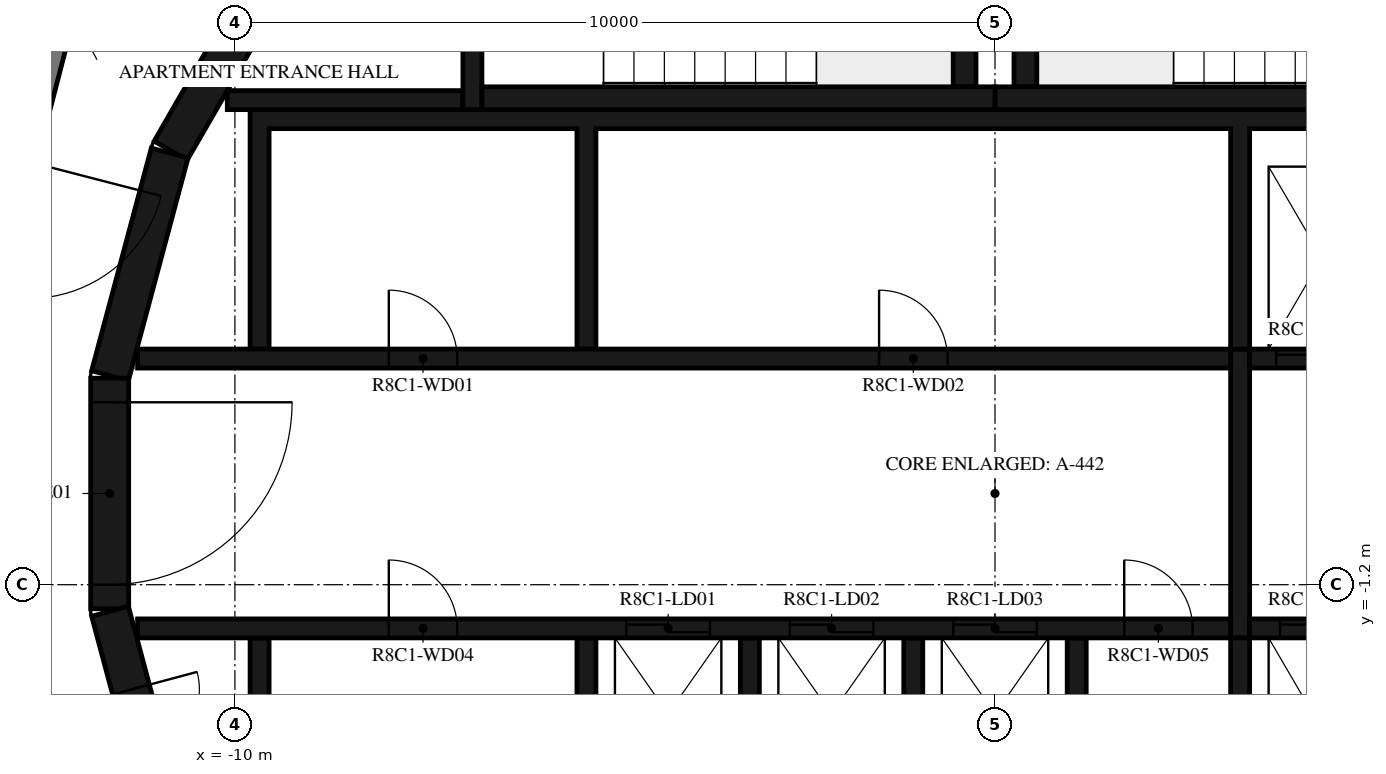
"""IFC4 building model, lengths in metres.
Left out: names, types, materials, properties, quantities, classifications, styles, units other than length and angle.
Written with IfcOpenShell. Run it as: python <this file> out.ifc"""

import sys

from ifc_helpers import new_model, si_unit, direction, frame, frame_2d, origin, place, context, subcontext, project, spatial, polyline, rectangle, outline, extrude, element, fill, save


model = new_model("IFC4")
c1 = context("Model", 3, precision=1e-05, world=origin(), true_north=direction((0.0, 1.0)))
c2 = subcontext(c1, "Body", "Model", "MODEL_VIEW")
j1 = project(units=[si_unit("LENGTHUNIT", "METRE"), si_unit("PLANEANGLEUNIT", "RADIAN")], contexts=[c1])
p1 = place(None, origin())
s1 = spatial("IfcSite", under=j1, at=p1, CompositionType="ELEMENT")
p2 = place(p1, origin())
s2 = spatial("IfcBuilding", under=s1, at=p2, CompositionType="ELEMENT")
p3 = place(p2, frame((0.0, 0.0, 322.7)))
s3 = spatial("IfcBuildingStorey", under=s2, at=p3, CompositionType="ELEMENT", Elevation=322.7)
for number, where, z_axis, x_axis in (
    (1, (-9.329, 7.137, 0.0), (0.0, 0.0, 1.0), (-0.5, -0.866, 0.0)),
    (2, (-10.858, 4.479, 0.0), (0.0, 0.0, 1.0), (-0.259, -0.966, 0.0)),
):
    element("IfcWall", number, at=place(p3, frame(where, z_axis=z_axis, x_axis=x_axis)), inside=s3, PredefinedType="SHEAR", context=c2, shape_type="SweptSolid", body=[
        extrude(rectangle(XDim=3.033, YDim=0.5, at=frame_2d((1.516, 0.0))), origin(), (0.0, 0.0, 1.0), 3.05),
    ])
p4 = place(p3, frame((-11.647, 1.516, 0.0), z_axis=(0.0, 0.0, 1.0), x_axis=(0.0, -1.0, 0.0)))
e3 = element("IfcWall", 3, at=p4, inside=s3, PredefinedType="SHEAR", context=c2, shape_type="SweptSolid", body=[
    extrude(rectangle(XDim=3.033, YDim=0.5, at=frame_2d((1.516, 0.0))), origin(), (0.0, 0.0, 1.0), 3.05),
])
p5 = place(p4, frame((0.316, 0.0, 0.0)))
e4 = element("IfcOpeningElement", 4, at=p5, cuts=e3, PredefinedType="OPENING", context=c2, shape_type="SweptSolid", body=[
    extrude(rectangle(XDim=2.4, YDim=2.1, at=frame_2d((1.2, 1.05))), frame((0.0, 0.26, 0.0), z_axis=(0.0, -1.0, 0.0), x_axis=(1.0, 0.0, 0.0)), (0.0, 0.0, 1.0), 0.52),
])
p6 = place(p3, frame((-11.643, -1.55, 0.0), z_axis=(0.0, 0.0, 1.0), x_axis=(0.258734743916, -0.965948410781, 0.0)))
e5 = element("IfcWall", 5, at=p6, inside=s3, PredefinedType="SHEAR", context=c2, shape_type="SweptSolid", body=[
    extrude(rectangle(XDim=3.033, YDim=0.5, at=frame_2d((1.516, 0.0))), origin(), (0.0, 0.0, 1.0), 3.05),
])
p7 = place(p6, frame((1.066, 0.0, 0.0)))
e6 = element("IfcOpeningElement", 6, at=p7, cuts=e5, PredefinedType="OPENING", context=c2, shape_type="SweptSolid", body=[
    extrude(rectangle(XDim=0.9, YDim=2.1, at=frame_2d((0.45, 1.05))), frame((0.0, 0.26, 0.0), z_axis=(0.0, -1.0, 0.0), x_axis=(1.0, 0.0, 0.0)), (0.0, 0.0, 1.0), 0.52),
])
p8 = place(p3, frame((0.0, 5.2, 0.0), z_axis=(0.0, 0.0, 1.0), x_axis=(1.0, 0.0, 0.0)))
e7 = element("IfcWall", 7, at=p8, inside=s3, PredefinedType="SHEAR", context=c2, shape_type="SweptSolid", body=[
    extrude(rectangle(XDim=6.75, YDim=0.3, at=frame_2d((3.375, 0.0))), origin(), (0.0, 0.0, 1.0), 3.05),
])
p9 = place(p3, frame((0.4, 5.35, 0.0), z_axis=(0.0, 0.0, 1.0), x_axis=(0.0, 1.0, 0.0)))
e8 = element("IfcWall", 8, at=p9, inside=s3, PredefinedType="SHEAR", context=c2, shape_type="SweptSolid", body=[
    extrude(rectangle(XDim=3.32, YDim=0.3, at=frame_2d((1.66, 0.0))), origin(), (0.0, 0.0, 1.0), 3.05),
])
p10 = place(p3, frame((-6.75, 5.2, 0.0), z_axis=(0.0, 0.0, 1.0), x_axis=(1.0, 0.0, 0.0)))
e9 = element("IfcWall", 9, at=p10, inside=s3, PredefinedType="SHEAR", context=c2, shape_type="SweptSolid", body=[
    extrude(rectangle(XDim=6.75, YDim=0.3, at=frame_2d((3.375, 0.0))), origin(), (0.0, 0.0, 1.0), 3.05),
])
p11 = place(p3, frame((-0.4, 5.35, 0.0), z_axis=(0.0, 0.0, 1.0), x_axis=(0.0, 1.0, 0.0)))
e10 = element("IfcWall", 10, at=p11, inside=s3, PredefinedType="SHEAR", context=c2, shape_type="SweptSolid", body=[
    extrude(rectangle(XDim=3.32, YDim=0.3, at=frame_2d((1.66, 0.0))), origin(), (0.0, 0.0, 1.0), 3.05),
])
p12 = place(p3, frame((-6.875, 8.97, 0.0), z_axis=(0.0, 0.0, 1.0), x_axis=(0.0, -1.0, 0.0)))
e11 = element("IfcWall", 11, at=p12, inside=s3, PredefinedType="SHEAR", context=c2, shape_type="SweptSolid", body=[
    extrude(rectangle(XDim=3.92, YDim=0.25, at=frame_2d((1.96, 0.0))), origin(), (0.0, 0.0, 1.0), 3.05),
])
p13 = place(p12, frame((1.61, 0.0, 0.0)))
e12 = element("IfcOpeningElement", 12, at=p13, cuts=e11, PredefinedType="OPENING", context=c2, shape_type="SweptSolid", body=[
    extrude(rectangle(XDim=1.2, YDim=2.1, at=frame_2d((0.6, 1.05))), frame((0.0, 0.135, 0.0), z_axis=(0.0, -1.0, 0.0), x_axis=(1.0, 0.0, 0.0)), (0.0, 0.0, 1.0), 0.27),
])
p14 = place(p3, frame((-7.0, 5.175, 0.0), z_axis=(0.0, 0.0, 1.0), x_axis=(-1.0, 0.0, 0.0)))
e13 = element("IfcWall", 13, at=p14, inside=s3, PredefinedType="SHEAR", context=c2, shape_type="SweptSolid", body=[
    extrude(rectangle(XDim=3.1, YDim=0.25, at=frame_2d((1.55, 0.0))), origin(), (0.0, 0.0, 1.0), 3.05),
])
p15 = place(p3, origin())
e14 = element("IfcWall", 14, at=p15, inside=s3, PredefinedType="SHEAR", context=c2, shape_type="SweptSolid", body=[
    extrude(outline(polyline([(-9.8, 1.9), (-9.55, 1.9), (-9.55, 4.8), (-5.5, 4.8), (-5.5, 1.9), (-5.25, 1.9), (-5.25, 4.8), (3.1, 4.8), (3.1, 1.9), (3.35, 1.9), (3.35, 4.8), (5.25, 4.8), (5.25, 1.9), (5.5, 1.9), (5.5, 4.8), (7.4, 4.8), (7.4, 1.9), (7.65, 1.9), (7.65, 4.8), (9.55, 4.8), (9.55, 1.9), (9.8, 1.9), (9.8, 4.8), (9.8, 5.05), (-9.8, 5.05), (-9.8, 4.8), (-9.8, 1.9)])), origin(), (0.0, 0.0, 1.0), 3.05),
])
p16 = place(p3, origin())
e15 = element("IfcWall", 15, at=p16, inside=s3, PredefinedType="SHEAR", context=c2, shape_type="SweptSolid", body=[
    extrude(outline(polyline([(9.8, -5.05), (9.8, -4.8), (9.8, -1.9), (9.55, -1.9), (9.55, -4.8), (7.65, -4.8), (7.65, -1.9), (7.4, -1.9), (7.4, -4.8), (5.5, -4.8), (5.5, -1.9), (5.25, -1.9), (5.25, -4.8), (3.35, -4.8), (3.35, -1.9), (3.1, -1.9), (3.1, -4.8), (1.2, -4.8), (1.2, -1.9), (0.95, -1.9), (0.95, -4.8), (-0.95, -4.8), (-0.95, -1.9), (-1.2, -1.9), (-1.2, -4.8), (-3.1, -4.8), (-3.1, -1.9), (-3.35, -1.9), (-3.35, -4.8), (-5.25, -4.8), (-5.25, -1.9), (-5.5, -1.9), (-5.5, -4.8), (-9.55, -4.8), (-9.55, -1.9), (-9.8, -1.9), (-9.8, -4.8), (-9.8, -5.05), (9.8, -5.05)])), origin(), (0.0, 0.0, 1.0), 3.05),
])
p17 = place(p3, frame((-11.28, 1.775, 0.0), z_axis=(0.0, 0.0, 1.0), x_axis=(1.0, 0.0, 0.0)))
e16 = element("IfcWall", 16, at=p17, inside=s3, PredefinedType="SHEAR", context=c2, shape_type="SweptSolid", body=[
    extrude(rectangle(XDim=14.38, YDim=0.25, at=frame_2d((7.19, 0.0))), origin(), (0.0, 0.0, 1.0), 3.05),
])
p18 = place(p17, frame((3.305, 0.0, 0.0)))
e17 = element("IfcOpeningElement", 17, at=p18, cuts=e16, PredefinedType="OPENING", context=c2, shape_type="SweptSolid", body=[
    extrude(rectangle(XDim=0.9, YDim=2.1, at=frame_2d((0.45, 1.05))), frame((0.0, 0.135, 0.0), z_axis=(0.0, -1.0, 0.0), x_axis=(1.0, 0.0, 0.0)), (0.0, 0.0, 1.0), 0.27),
])
p19 = place(p17, frame((9.755, 0.0, 0.0)))
e18 = element("IfcOpeningElement", 18, at=p19, cuts=e16, PredefinedType="OPENING", context=c2, shape_type="SweptSolid", body=[
    extrude(rectangle(XDim=0.9, YDim=2.1, at=frame_2d((0.45, 1.05))), frame((0.0, 0.135, 0.0), z_axis=(0.0, -1.0, 0.0), x_axis=(1.0, 0.0, 0.0)), (0.0, 0.0, 1.0), 0.27),
])
p20 = place(p3, frame((3.35, 1.775, 0.0), z_axis=(0.0, 0.0, 1.0), x_axis=(1.0, 0.0, 0.0)))
e19 = element("IfcWall", 19, at=p20, inside=s3, PredefinedType="SHEAR", context=c2, shape_type="SweptSolid", body=[
    extrude(rectangle(XDim=7.93, YDim=0.25, at=frame_2d((3.965, 0.0))), origin(), (0.0, 0.0, 1.0), 3.05),
])
p21 = place(p20, frame((0.35, 0.0, 0.0)))
e20 = element("IfcOpeningElement", 20, at=p21, cuts=e19, PredefinedType="OPENING", context=c2, shape_type="SweptSolid", body=[
    extrude(rectangle(XDim=1.2, YDim=2.4, at=frame_2d((0.6, 1.2))), frame((0.0, 0.135, 0.0), z_axis=(0.0, -1.0, 0.0), x_axis=(1.0, 0.0, 0.0)), (0.0, 0.0, 1.0), 0.27),
])
p22 = place(p20, frame((2.5, 0.0, 0.0)))
e21 = element("IfcOpeningElement", 21, at=p22, cuts=e19, PredefinedType="OPENING", context=c2, shape_type="SweptSolid", body=[
    extrude(rectangle(XDim=1.2, YDim=2.4, at=frame_2d((0.6, 1.2))), frame((0.0, 0.135, 0.0), z_axis=(0.0, -1.0, 0.0), x_axis=(1.0, 0.0, 0.0)), (0.0, 0.0, 1.0), 0.27),
])
p23 = place(p20, frame((4.8, 0.0, 0.0)))
e22 = element("IfcOpeningElement", 22, at=p23, cuts=e19, PredefinedType="OPENING", context=c2, shape_type="SweptSolid", body=[
    extrude(rectangle(XDim=0.9, YDim=2.1, at=frame_2d((0.45, 1.05))), frame((0.0, 0.135, 0.0), z_axis=(0.0, -1.0, 0.0), x_axis=(1.0, 0.0, 0.0)), (0.0, 0.0, 1.0), 0.27),
])
p24 = place(p3, frame((-11.28, -1.775, 0.0), z_axis=(0.0, 0.0, 1.0), x_axis=(1.0, 0.0, 0.0)))
e23 = element("IfcWall", 23, at=p24, inside=s3, PredefinedType="SHEAR", context=c2, shape_type="SweptSolid", body=[
    extrude(rectangle(XDim=14.38, YDim=0.25, at=frame_2d((7.19, 0.0))), origin(), (0.0, 0.0, 1.0), 3.05),
])
p25 = place(p24, frame((6.43, 0.0, 0.0)))
e24 = element("IfcOpeningElement", 24, at=p25, cuts=e23, PredefinedType="OPENING", context=c2, shape_type="SweptSolid", body=[
    extrude(rectangle(XDim=1.1, YDim=2.1, at=frame_2d((0.55, 1.05))), frame((0.0, 0.135, 0.0), z_axis=(0.0, -1.0, 0.0), x_axis=(1.0, 0.0, 0.0)), (0.0, 0.0, 1.0), 0.27),
])
p26 = place(p24, frame((8.58, 0.0, 0.0)))
e25 = element("IfcOpeningElement", 25, at=p26, cuts=e23, PredefinedType="OPENING", context=c2, shape_type="SweptSolid", body=[
    extrude(rectangle(XDim=1.1, YDim=2.1, at=frame_2d((0.55, 1.05))), frame((0.0, 0.135, 0.0), z_axis=(0.0, -1.0, 0.0), x_axis=(1.0, 0.0, 0.0)), (0.0, 0.0, 1.0), 0.27),
])
p27 = place(p24, frame((10.73, 0.0, 0.0)))
e26 = element("IfcOpeningElement", 26, at=p27, cuts=e23, PredefinedType="OPENING", context=c2, shape_type="SweptSolid", body=[
    extrude(rectangle(XDim=1.1, YDim=2.1, at=frame_2d((0.55, 1.05))), frame((0.0, 0.135, 0.0), z_axis=(0.0, -1.0, 0.0), x_axis=(1.0, 0.0, 0.0)), (0.0, 0.0, 1.0), 0.27),
])
p28 = place(p24, frame((3.305, 0.0, 0.0)))
e27 = element("IfcOpeningElement", 27, at=p28, cuts=e23, PredefinedType="OPENING", context=c2, shape_type="SweptSolid", body=[
    extrude(rectangle(XDim=0.9, YDim=2.1, at=frame_2d((0.45, 1.05))), frame((0.0, 0.135, 0.0), z_axis=(0.0, -1.0, 0.0), x_axis=(1.0, 0.0, 0.0)), (0.0, 0.0, 1.0), 0.27),
])
p29 = place(p24, frame((12.98, 0.0, 0.0)))
e28 = element("IfcOpeningElement", 28, at=p29, cuts=e23, PredefinedType="OPENING", context=c2, shape_type="SweptSolid", body=[
    extrude(rectangle(XDim=0.9, YDim=2.1, at=frame_2d((0.45, 1.05))), frame((0.0, 0.135, 0.0), z_axis=(0.0, -1.0, 0.0), x_axis=(1.0, 0.0, 0.0)), (0.0, 0.0, 1.0), 0.27),
])
p30 = place(p3, frame((3.35, -1.775, 0.0), z_axis=(0.0, 0.0, 1.0), x_axis=(1.0, 0.0, 0.0)))
e29 = element("IfcWall", 29, at=p30, inside=s3, PredefinedType="SHEAR", context=c2, shape_type="SweptSolid", body=[
    extrude(rectangle(XDim=7.93, YDim=0.25, at=frame_2d((3.965, 0.0))), origin(), (0.0, 0.0, 1.0), 3.05),
])
p31 = place(p30, frame((0.4, 0.0, 0.0)))
e30 = element("IfcOpeningElement", 30, at=p31, cuts=e29, PredefinedType="OPENING", context=c2, shape_type="SweptSolid", body=[
    extrude(rectangle(XDim=1.1, YDim=2.4, at=frame_2d((0.55, 1.2))), frame((0.0, 0.135, 0.0), z_axis=(0.0, -1.0, 0.0), x_axis=(1.0, 0.0, 0.0)), (0.0, 0.0, 1.0), 0.27),
])
p32 = place(p30, frame((2.55, 0.0, 0.0)))
e31 = element("IfcOpeningElement", 31, at=p32, cuts=e29, PredefinedType="OPENING", context=c2, shape_type="SweptSolid", body=[
    extrude(rectangle(XDim=1.1, YDim=2.4, at=frame_2d((0.55, 1.2))), frame((0.0, 0.135, 0.0), z_axis=(0.0, -1.0, 0.0), x_axis=(1.0, 0.0, 0.0)), (0.0, 0.0, 1.0), 0.27),
])
p33 = place(p30, frame((4.7, 0.0, 0.0)))
e32 = element("IfcOpeningElement", 32, at=p33, cuts=e29, PredefinedType="OPENING", context=c2, shape_type="SweptSolid", body=[
    extrude(rectangle(XDim=1.1, YDim=2.4, at=frame_2d((0.55, 1.2))), frame((0.0, 0.135, 0.0), z_axis=(0.0, -1.0, 0.0), x_axis=(1.0, 0.0, 0.0)), (0.0, 0.0, 1.0), 0.27),
])
p34 = place(p3, frame((3.225, -1.9, 0.0), z_axis=(0.0, 0.0, 1.0), x_axis=(0.0, 1.0, 0.0)))
e33 = element("IfcWall", 33, at=p34, inside=s3, PredefinedType="SHEAR", context=c2, shape_type="SweptSolid", body=[
    extrude(rectangle(XDim=3.8, YDim=0.25, at=frame_2d((1.9, 0.0))), origin(), (0.0, 0.0, 1.0), 3.05),
])
p35 = place(p3, frame((-12.074, 6.831, 0.0), z_axis=(0.0, 0.0, 1.0), x_axis=(-0.250391063186, -0.968144780225, 0.0)))
e34 = element("IfcWall", 34, at=p35, inside=s3, PredefinedType="STANDARD", context=c2, shape_type="SweptSolid", body=[
    extrude(rectangle(XDim=7.181, YDim=0.2, at=frame_2d((3.591, 0.0))), origin(), (0.0, 0.0, 1.0), 3.05),
])
p36 = place(p35, frame((2.548, 0.0, 0.0)))
e35 = element("IfcOpeningElement", 35, at=p36, cuts=e34, PredefinedType="OPENING", context=c2, shape_type="SweptSolid", body=[
    extrude(rectangle(XDim=1.8, YDim=2.1, at=frame_2d((0.9, 1.05))), frame((0.0, 0.11, 0.0), z_axis=(0.0, -1.0, 0.0), x_axis=(1.0, 0.0, 0.0)), (0.0, 0.0, 1.0), 0.22),
])
p37 = place(p3, frame((-13.872, -0.121, 0.0), z_axis=(0.0, 0.0, 1.0), x_axis=(0.267254575108, -0.963625960674, 0.0)))
e36 = element("IfcWall", 36, at=p37, inside=s3, PredefinedType="STANDARD", context=c2, shape_type="SweptSolid", body=[
    extrude(rectangle(XDim=7.181, YDim=0.2, at=frame_2d((3.591, 0.0))), origin(), (0.0, 0.0, 1.0), 3.05),
])
p38 = place(p5, origin())
e37 = element("IfcDoor", 37, at=p38, inside=s3, OperationType="DOUBLE_DOOR_SINGLE_SWING", PredefinedType="DOOR", context=c2, shape_type="SweptSolid", body=[
    extrude(rectangle(XDim=2.4, YDim=2.1, at=frame_2d((1.2, 1.05))), frame((0.0, 0.025, 0.0), z_axis=(0.0, -1.0, 0.0), x_axis=(1.0, 0.0, 0.0)), (0.0, 0.0, 1.0), 0.05),
])
fill(e4, e37)
p39 = place(p21, origin())
e38 = element("IfcDoor", 38, at=p39, inside=s3, OperationType="DOUBLE_DOOR_SLIDING", PredefinedType="DOOR", context=c2, shape_type="SweptSolid", body=[
    extrude(rectangle(XDim=1.2, YDim=2.4, at=frame_2d((0.6, 1.2))), frame((0.0, 0.025, 0.0), z_axis=(0.0, -1.0, 0.0), x_axis=(1.0, 0.0, 0.0)), (0.0, 0.0, 1.0), 0.05),
])
fill(e20, e38)
p40 = place(p25, origin())
e39 = element("IfcDoor", 39, at=p40, inside=s3, OperationType="DOUBLE_DOOR_SLIDING", PredefinedType="DOOR", context=c2, shape_type="SweptSolid", body=[
    extrude(rectangle(XDim=1.1, YDim=2.1, at=frame_2d((0.55, 1.05))), frame((0.0, 0.025, 0.0), z_axis=(0.0, -1.0, 0.0), x_axis=(1.0, 0.0, 0.0)), (0.0, 0.0, 1.0), 0.05),
])
fill(e24, e39)
p41 = place(p26, origin())
e40 = element("IfcDoor", 40, at=p41, inside=s3, OperationType="DOUBLE_DOOR_SLIDING", PredefinedType="DOOR", context=c2, shape_type="SweptSolid", body=[
    extrude(rectangle(XDim=1.1, YDim=2.1, at=frame_2d((0.55, 1.05))), frame((0.0, 0.025, 0.0), z_axis=(0.0, -1.0, 0.0), x_axis=(1.0, 0.0, 0.0)), (0.0, 0.0, 1.0), 0.05),
])
fill(e25, e40)
p42 = place(p27, origin())
e41 = element("IfcDoor", 41, at=p42, inside=s3, OperationType="DOUBLE_DOOR_SLIDING", PredefinedType="DOOR", context=c2, shape_type="SweptSolid", body=[
    extrude(rectangle(XDim=1.1, YDim=2.1, at=frame_2d((0.55, 1.05))), frame((0.0, 0.025, 0.0), z_axis=(0.0, -1.0, 0.0), x_axis=(1.0, 0.0, 0.0)), (0.0, 0.0, 1.0), 0.05),
])
fill(e26, e41)
p43 = place(p31, origin())
e42 = element("IfcDoor", 42, at=p43, inside=s3, OperationType="DOUBLE_DOOR_SLIDING", PredefinedType="DOOR", context=c2, shape_type="SweptSolid", body=[
    extrude(rectangle(XDim=1.1, YDim=2.4, at=frame_2d((0.55, 1.2))), frame((0.0, 0.025, 0.0), z_axis=(0.0, -1.0, 0.0), x_axis=(1.0, 0.0, 0.0)), (0.0, 0.0, 1.0), 0.05),
])
fill(e30, e42)
p44 = place(p18, origin())
e43 = element("IfcDoor", 43, at=p44, inside=s3, OperationType="SINGLE_SWING_LEFT", PredefinedType="DOOR", context=c2, shape_type="SweptSolid", body=[
    extrude(rectangle(XDim=0.9, YDim=2.1, at=frame_2d((0.45, 1.05))), frame((0.0, 0.025, 0.0), z_axis=(0.0, -1.0, 0.0), x_axis=(1.0, 0.0, 0.0)), (0.0, 0.0, 1.0), 0.05),
])
fill(e17, e43)
p45 = place(p19, origin())
e44 = element("IfcDoor", 44, at=p45, inside=s3, OperationType="SINGLE_SWING_RIGHT", PredefinedType="DOOR", context=c2, shape_type="SweptSolid", body=[
    extrude(rectangle(XDim=0.9, YDim=2.1, at=frame_2d((0.45, 1.05))), frame((0.0, 0.025, 0.0), z_axis=(0.0, -1.0, 0.0), x_axis=(1.0, 0.0, 0.0)), (0.0, 0.0, 1.0), 0.05),
])
fill(e18, e44)
p46 = place(p28, origin())
e45 = element("IfcDoor", 45, at=p46, inside=s3, OperationType="SINGLE_SWING_RIGHT", PredefinedType="DOOR", context=c2, shape_type="SweptSolid", body=[
    extrude(rectangle(XDim=0.9, YDim=2.1, at=frame_2d((0.45, 1.05))), frame((0.0, 0.025, 0.0), z_axis=(0.0, -1.0, 0.0), x_axis=(1.0, 0.0, 0.0)), (0.0, 0.0, 1.0), 0.05),
])
fill(e27, e45)
p47 = place(p29, origin())
e46 = element("IfcDoor", 46, at=p47, inside=s3, OperationType="SINGLE_SWING_LEFT", PredefinedType="DOOR", context=c2, shape_type="SweptSolid", body=[
    extrude(rectangle(XDim=0.9, YDim=2.1, at=frame_2d((0.45, 1.05))), frame((0.0, 0.025, 0.0), z_axis=(0.0, -1.0, 0.0), x_axis=(1.0, 0.0, 0.0)), (0.0, 0.0, 1.0), 0.05),
])
fill(e28, e46)
p48 = place(p7, origin())
e47 = element("IfcDoor", 47, at=p48, inside=s3, OperationType="SINGLE_SWING_RIGHT", PredefinedType="DOOR", context=c2, shape_type="SweptSolid", body=[
    extrude(rectangle(XDim=0.9, YDim=2.1, at=frame_2d((0.45, 1.05))), frame((0.0, 0.025, 0.0), z_axis=(0.0, -1.0, 0.0), x_axis=(1.0, 0.0, 0.0)), (0.0, 0.0, 1.0), 0.05),
])
fill(e6, e47)
save(model, sys.argv[1])
